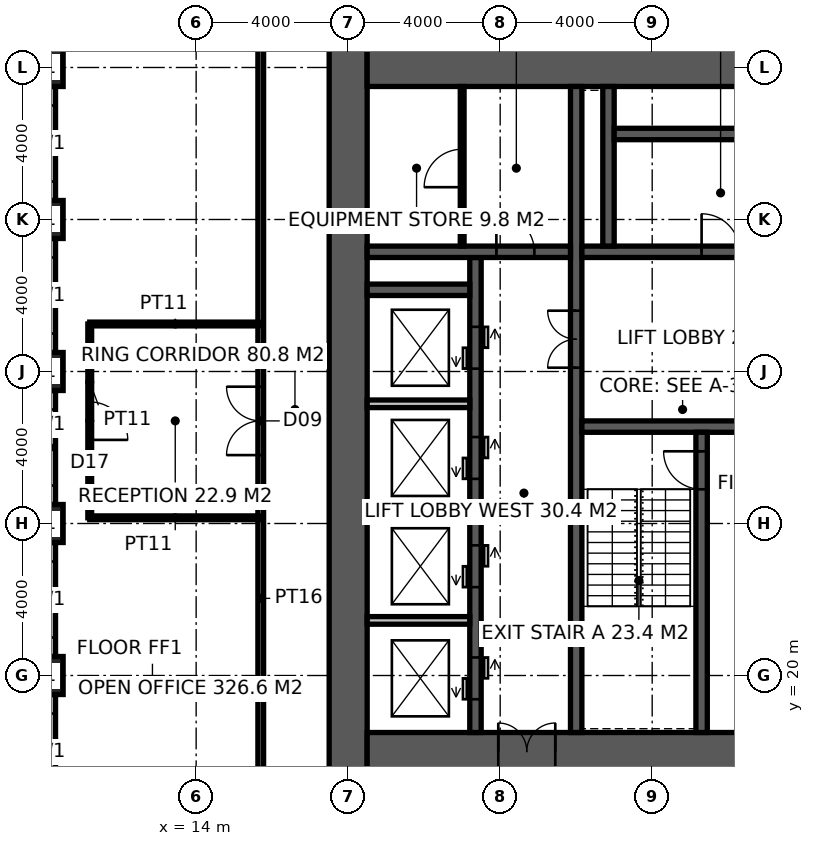
"""IFC4 building model, lengths in metres.
Left out: names, types, materials, properties, quantities, classifications, styles, units other than length and angle.
Written with IfcOpenShell. Run it as: python <this file> out.ifc"""

import sys

from ifc_helpers import new_model, si_unit, direction, frame, frame_2d, origin, origin_2d, place, context, subcontext, project, spatial, rectangle, hollow_rectangle, extrude, element, fill, save


model = new_model("IFC4")
c1 = context("Model", 3, precision=1e-05, world=origin(), true_north=direction((0.0, 1.0)))
c2 = subcontext(c1, "Body", "Model", "MODEL_VIEW")
j1 = project(units=[si_unit("LENGTHUNIT", "METRE"), si_unit("PLANEANGLEUNIT", "RADIAN")], contexts=[c1])
p1 = place(None, origin())
s1 = spatial("IfcSite", under=j1, at=p1, CompositionType="ELEMENT")
p2 = place(p1, origin())
s2 = spatial("IfcBuilding", under=s1, at=p2, CompositionType="ELEMENT")
p3 = place(p2, frame((0.0, 0.0, 254.2)))
s3 = spatial("IfcBuildingStorey", under=s2, at=p3, CompositionType="ELEMENT", Elevation=254.2)
for number, where, z_axis, x_axis in (
    (1, (10.0, 20.0, 0.0), (0.0, 0.0, 1.0), (1.0, 0.0, 0.0)),
    (2, (10.0, 24.0, 0.0), (0.0, 0.0, 1.0), (1.0, 0.0, 0.0)),
    (3, (10.0, 28.0, 0.0), (0.0, 0.0, 1.0), (1.0, 0.0, 0.0)),
    (4, (10.0, 32.0, 0.0), (0.0, 0.0, 1.0), (1.0, 0.0, 0.0)),
    (5, (10.0, 36.0, 0.0), (0.0, 0.0, 1.0), (1.0, 0.0, 0.0)),
):
    element("IfcColumn", number, at=place(p3, frame(where, z_axis=z_axis, x_axis=x_axis)), inside=s3, PredefinedType="COLUMN", context=c2, shape_type="SweptSolid", body=[
        extrude(hollow_rectangle(XDim=1.0, YDim=1.0, WallThickness=0.1, at=origin_2d()), origin(), (0.0, 0.0, 1.0), 4.0),
    ])
p4 = place(p3, frame((18.0, 17.5, -0.15), z_axis=(0.0, 0.0, 1.0), x_axis=(0.0, 1.0, 0.0)))
e6 = element("IfcWall", 6, at=p4, inside=s3, PredefinedType="SHEAR", context=c2, shape_type="SweptSolid", body=[
    extrude(rectangle(XDim=19.0, YDim=1.0, at=frame_2d((9.5, 0.0))), origin(), (0.0, 0.0, 1.0), 4.0),
])
p5 = place(p3, frame((18.5, 18.0, -0.15), z_axis=(0.0, 0.0, 1.0), x_axis=(1.0, 0.0, 0.0)))
e7 = element("IfcWall", 7, at=p5, inside=s3, PredefinedType="SHEAR", context=c2, shape_type="SweptSolid", body=[
    extrude(rectangle(XDim=17.6, YDim=1.0, at=frame_2d((8.8, 0.0))), origin(), (0.0, 0.0, 1.0), 4.0),
])
p6 = place(p5, frame((3.45, 0.0, 0.15)))
e8 = element("IfcOpeningElement", 8, at=p6, cuts=e7, PredefinedType="OPENING", context=c2, shape_type="SweptSolid", body=[
    extrude(rectangle(XDim=1.5, YDim=2.4, at=frame_2d((0.75, 1.2))), frame((0.0, 0.51, 0.0), z_axis=(0.0, -1.0, 0.0), x_axis=(1.0, 0.0, 0.0)), (0.0, 0.0, 1.0), 1.02),
])
p7 = place(p3, frame((18.5, 36.0, -0.15), z_axis=(0.0, 0.0, 1.0), x_axis=(1.0, 0.0, 0.0)))
e9 = element("IfcWall", 9, at=p7, inside=s3, PredefinedType="SHEAR", context=c2, shape_type="SweptSolid", body=[
    extrude(rectangle(XDim=17.6, YDim=1.0, at=frame_2d((8.8, 0.0))), origin(), (0.0, 0.0, 1.0), 4.0),
])
p8 = place(p3, frame((24.0, 18.5, -0.15), z_axis=(0.0, 0.0, 1.0), x_axis=(0.0, 1.0, 0.0)))
e10 = element("IfcWall", 10, at=p8, inside=s3, PredefinedType="SHEAR", context=c2, shape_type="SweptSolid", body=[
    extrude(rectangle(XDim=17.0, YDim=0.3, at=frame_2d((8.5, 0.0))), origin(), (0.0, 0.0, 1.0), 4.0),
])
p9 = place(p8, frame((9.6, 0.0, 0.15)))
e11 = element("IfcOpeningElement", 11, at=p9, cuts=e10, PredefinedType="OPENING", context=c2, shape_type="SweptSolid", body=[
    extrude(rectangle(XDim=1.5, YDim=2.4, at=frame_2d((0.75, 1.2))), frame((0.0, 0.16, 0.0), z_axis=(0.0, -1.0, 0.0), x_axis=(1.0, 0.0, 0.0)), (0.0, 0.0, 1.0), 0.32),
])
p10 = place(p3, frame((24.15, 26.55, -0.15), z_axis=(0.0, 0.0, 1.0), x_axis=(1.0, 0.0, 0.0)))
e12 = element("IfcWall", 12, at=p10, inside=s3, PredefinedType="SHEAR", context=c2, shape_type="SweptSolid", body=[
    extrude(rectangle(XDim=11.25, YDim=0.3, at=frame_2d((5.625, 0.0))), origin(), (0.0, 0.0, 1.0), 4.0),
])
p11 = place(p10, frame((9.25, 0.0, 0.15)))
e13 = element("IfcOpeningElement", 13, at=p11, cuts=e12, PredefinedType="OPENING", context=c2, shape_type="SweptSolid", body=[
    extrude(rectangle(XDim=1.0, YDim=2.2, at=frame_2d((0.5, 1.1))), frame((0.0, 0.16, 0.0), z_axis=(0.0, -1.0, 0.0), x_axis=(1.0, 0.0, 0.0)), (0.0, 0.0, 1.0), 0.32),
])
p12 = place(p10, frame((4.9, 0.0, 0.15)))
e14 = element("IfcOpeningElement", 14, at=p12, cuts=e12, PredefinedType="OPENING", context=c2, shape_type="SweptSolid", body=[
    extrude(rectangle(XDim=1.5, YDim=2.4, at=frame_2d((0.75, 1.2))), frame((0.0, 0.16, 0.0), z_axis=(0.0, -1.0, 0.0), x_axis=(1.0, 0.0, 0.0)), (0.0, 0.0, 1.0), 0.32),
])
p13 = place(p3, frame((27.3, 18.5, -0.15), z_axis=(0.0, 0.0, 1.0), x_axis=(0.0, 1.0, 0.0)))
e15 = element("IfcWall", 15, at=p13, inside=s3, PredefinedType="SHEAR", context=c2, shape_type="SweptSolid", body=[
    extrude(rectangle(XDim=7.9, YDim=0.3, at=frame_2d((3.95, 0.0))), origin(), (0.0, 0.0, 1.0), 4.0),
])
p14 = place(p13, frame((6.4, 0.0, 0.15)))
e16 = element("IfcOpeningElement", 16, at=p14, cuts=e15, PredefinedType="OPENING", context=c2, shape_type="SweptSolid", body=[
    extrude(rectangle(XDim=1.0, YDim=2.2, at=frame_2d((0.5, 1.1))), frame((0.0, 0.16, 0.0), z_axis=(0.0, -1.0, 0.0), x_axis=(1.0, 0.0, 0.0)), (0.0, 0.0, 1.0), 0.32),
])
p15 = place(p3, frame((24.15, 31.15, -0.15), z_axis=(0.0, 0.0, 1.0), x_axis=(1.0, 0.0, 0.0)))
e17 = element("IfcWall", 17, at=p15, inside=s3, PredefinedType="SHEAR", context=c2, shape_type="SweptSolid", body=[
    extrude(rectangle(XDim=11.25, YDim=0.3, at=frame_2d((5.625, 0.0))), origin(), (0.0, 0.0, 1.0), 4.0),
])
p16 = place(p15, frame((3.15, 0.0, 0.15)))
e18 = element("IfcOpeningElement", 18, at=p16, cuts=e17, PredefinedType="OPENING", context=c2, shape_type="SweptSolid", body=[
    extrude(rectangle(XDim=1.0, YDim=2.2, at=frame_2d((0.5, 1.1))), frame((0.0, 0.16, 0.0), z_axis=(0.0, -1.0, 0.0), x_axis=(1.0, 0.0, 0.0)), (0.0, 0.0, 1.0), 0.32),
])
p17 = place(p15, frame((7.25, 0.0, 0.15)))
e19 = element("IfcOpeningElement", 19, at=p17, cuts=e17, PredefinedType="OPENING", context=c2, shape_type="SweptSolid", body=[
    extrude(rectangle(XDim=1.4, YDim=2.4, at=frame_2d((0.7, 1.2))), frame((0.0, 0.16, 0.0), z_axis=(0.0, -1.0, 0.0), x_axis=(1.0, 0.0, 0.0)), (0.0, 0.0, 1.0), 0.32),
])
p18 = place(p3, frame((21.35, 18.5, -0.15), z_axis=(0.0, 0.0, 1.0), x_axis=(0.0, 1.0, 0.0)))
e20 = element("IfcWall", 20, at=p18, inside=s3, PredefinedType="SHEAR", context=c2, shape_type="SweptSolid", body=[
    extrude(rectangle(XDim=12.5, YDim=0.3, at=frame_2d((6.25, 0.0))), origin(), (0.0, 0.0, 1.0), 4.0),
])
p19 = place(p18, frame((0.875, 0.0, 0.15)))
e21 = element("IfcOpeningElement", 21, at=p19, cuts=e20, PredefinedType="OPENING", context=c2, shape_type="SweptSolid", body=[
    extrude(rectangle(XDim=1.1, YDim=2.2, at=frame_2d((0.55, 1.1))), frame((0.0, 0.16, 0.0), z_axis=(0.0, -1.0, 0.0), x_axis=(1.0, 0.0, 0.0)), (0.0, 0.0, 1.0), 0.32),
])
p20 = place(p18, frame((3.825, 0.0, 0.15)))
e22 = element("IfcOpeningElement", 22, at=p20, cuts=e20, PredefinedType="OPENING", context=c2, shape_type="SweptSolid", body=[
    extrude(rectangle(XDim=1.1, YDim=2.2, at=frame_2d((0.55, 1.1))), frame((0.0, 0.16, 0.0), z_axis=(0.0, -1.0, 0.0), x_axis=(1.0, 0.0, 0.0)), (0.0, 0.0, 1.0), 0.32),
])
p21 = place(p18, frame((6.675, 0.0, 0.15)))
e23 = element("IfcOpeningElement", 23, at=p21, cuts=e20, PredefinedType="OPENING", context=c2, shape_type="SweptSolid", body=[
    extrude(rectangle(XDim=1.1, YDim=2.2, at=frame_2d((0.55, 1.1))), frame((0.0, 0.16, 0.0), z_axis=(0.0, -1.0, 0.0), x_axis=(1.0, 0.0, 0.0)), (0.0, 0.0, 1.0), 0.32),
])
p22 = place(p18, frame((9.575, 0.0, 0.15)))
e24 = element("IfcOpeningElement", 24, at=p22, cuts=e20, PredefinedType="OPENING", context=c2, shape_type="SweptSolid", body=[
    extrude(rectangle(XDim=1.1, YDim=2.2, at=frame_2d((0.55, 1.1))), frame((0.0, 0.16, 0.0), z_axis=(0.0, -1.0, 0.0), x_axis=(1.0, 0.0, 0.0)), (0.0, 0.0, 1.0), 0.32),
])
p23 = place(p3, frame((18.5, 31.15, -0.15), z_axis=(0.0, 0.0, 1.0), x_axis=(1.0, 0.0, 0.0)))
e25 = element("IfcWall", 25, at=p23, inside=s3, PredefinedType="SHEAR", context=c2, shape_type="SweptSolid", body=[
    extrude(rectangle(XDim=5.35, YDim=0.3, at=frame_2d((2.675, 0.0))), origin(), (0.0, 0.0, 1.0), 4.0),
])
p24 = place(p23, frame((3.4, 0.0, 0.15)))
e26 = element("IfcOpeningElement", 26, at=p24, cuts=e25, PredefinedType="OPENING", context=c2, shape_type="SweptSolid", body=[
    extrude(rectangle(XDim=1.0, YDim=2.2, at=frame_2d((0.5, 1.1))), frame((0.0, 0.16, 0.0), z_axis=(0.0, -1.0, 0.0), x_axis=(1.0, 0.0, 0.0)), (0.0, 0.0, 1.0), 0.32),
])
p25 = place(p3, frame((18.5, 30.15, -0.15), z_axis=(0.0, 0.0, 1.0), x_axis=(1.0, 0.0, 0.0)))
e27 = element("IfcWall", 27, at=p25, inside=s3, PredefinedType="SHEAR", context=c2, shape_type="SweptSolid", body=[
    extrude(rectangle(XDim=2.7, YDim=0.3, at=frame_2d((1.35, 0.0))), origin(), (0.0, 0.0, 1.0), 4.0),
])
p26 = place(p3, frame((24.85, 31.3, -0.15), z_axis=(0.0, 0.0, 1.0), x_axis=(0.0, 1.0, 0.0)))
e28 = element("IfcWall", 28, at=p26, inside=s3, PredefinedType="SHEAR", context=c2, shape_type="SweptSolid", body=[
    extrude(rectangle(XDim=4.2, YDim=0.3, at=frame_2d((2.1, 0.0))), origin(), (0.0, 0.0, 1.0), 4.0),
])
p27 = place(p3, frame((25.0, 34.25, -0.15), z_axis=(0.0, 0.0, 1.0), x_axis=(1.0, 0.0, 0.0)))
e29 = element("IfcWall", 29, at=p27, inside=s3, PredefinedType="SHEAR", context=c2, shape_type="SweptSolid", body=[
    extrude(rectangle(XDim=8.6, YDim=0.3, at=frame_2d((4.3, 0.0))), origin(), (0.0, 0.0, 1.0), 4.0),
])
for number, where, z_axis, x_axis in (
    (30, (18.5, 21.45, -0.15), (0.0, 0.0, 1.0), (1.0, 0.0, 0.0)),
    (31, (18.5, 24.3, -0.15), (0.0, 0.0, 1.0), (1.0, 0.0, 0.0)),
    (32, (18.5, 27.15, -0.15), (0.0, 0.0, 1.0), (1.0, 0.0, 0.0)),
):
    element("IfcWall", number, at=place(p3, frame(where, z_axis=z_axis, x_axis=x_axis)), inside=s3, PredefinedType="SOLIDWALL", context=c2, shape_type="SweptSolid", body=[
        extrude(rectangle(XDim=2.7, YDim=0.2, at=frame_2d((1.35, 0.0))), origin(), (0.0, 0.0, 1.0), 4.0),
    ])
p28 = place(p3, frame((21.0, 31.3, 0.0), z_axis=(0.0, 0.0, 1.0), x_axis=(0.0, 1.0, 0.0)))
e33 = element("IfcWall", 33, at=p28, inside=s3, PredefinedType="PARTITIONING", context=c2, shape_type="SweptSolid", body=[
    extrude(rectangle(XDim=4.2, YDim=0.1, at=frame_2d((2.1, 0.0))), origin(), (0.0, 0.0, 1.0), 3.85),
])
p29 = place(p28, frame((1.55, 0.0, 0.0)))
e34 = element("IfcOpeningElement", 34, at=p29, cuts=e33, PredefinedType="OPENING", context=c2, shape_type="SweptSolid", body=[
    extrude(rectangle(XDim=1.0, YDim=2.2, at=frame_2d((0.5, 1.1))), frame((0.0, 0.06, 0.0), z_axis=(0.0, -1.0, 0.0), x_axis=(1.0, 0.0, 0.0)), (0.0, 0.0, 1.0), 0.12),
])
p30 = place(p3, frame((15.7, 15.025, 0.0), z_axis=(0.0, 0.0, 1.0), x_axis=(0.0, 1.0, 0.0)))
e35 = element("IfcWall", 35, at=p30, inside=s3, PredefinedType="PARTITIONING", context=c2, shape_type="SweptSolid", body=[
    extrude(rectangle(XDim=23.35, YDim=0.15, at=frame_2d((11.675, 0.0))), origin(), (0.0, 0.0, 1.0), 3.85),
])
p31 = place(p30, frame((10.775, 0.0, 0.0)))
e36 = element("IfcOpeningElement", 36, at=p31, cuts=e35, PredefinedType="OPENING", context=c2, shape_type="SweptSolid", body=[
    extrude(rectangle(XDim=1.8, YDim=2.4, at=frame_2d((0.9, 1.2))), frame((0.0, 0.085, 0.0), z_axis=(0.0, -1.0, 0.0), x_axis=(1.0, 0.0, 0.0)), (0.0, 0.0, 1.0), 0.17),
])
p32 = place(p3, frame((15.7, 29.25, 0.0), z_axis=(0.0, 0.0, 1.0), x_axis=(-1.0, 0.0, 0.0)))
e37 = element("IfcWall", 37, at=p32, inside=s3, PredefinedType="PARTITIONING", context=c2, shape_type="SweptSolid", body=[
    extrude(rectangle(XDim=4.5, YDim=0.1, at=frame_2d((2.25, 0.0))), origin(), (0.0, 0.0, 1.0), 3.85),
])
p33 = place(p3, frame((11.2, 29.25, 0.0), z_axis=(0.0, 0.0, 1.0), x_axis=(0.0, -1.0, 0.0)))
e38 = element("IfcWall", 38, at=p33, inside=s3, PredefinedType="PARTITIONING", context=c2, shape_type="SweptSolid", body=[
    extrude(rectangle(XDim=5.1, YDim=0.1, at=frame_2d((2.55, 0.0))), origin(), (0.0, 0.0, 1.0), 3.85),
])
p34 = place(p33, frame((2.05, 0.0, 0.0)))
e39 = element("IfcOpeningElement", 39, at=p34, cuts=e38, PredefinedType="OPENING", context=c2, shape_type="SweptSolid", body=[
    extrude(rectangle(XDim=1.0, YDim=2.2, at=frame_2d((0.5, 1.1))), frame((0.0, 0.06, 0.0), z_axis=(0.0, -1.0, 0.0), x_axis=(1.0, 0.0, 0.0)), (0.0, 0.0, 1.0), 0.12),
])
p35 = place(p3, frame((11.2, 24.15, 0.0), z_axis=(0.0, 0.0, 1.0), x_axis=(1.0, 0.0, 0.0)))
e40 = element("IfcWall", 40, at=p35, inside=s3, PredefinedType="PARTITIONING", context=c2, shape_type="SweptSolid", body=[
    extrude(rectangle(XDim=4.5, YDim=0.1, at=frame_2d((2.25, 0.0))), origin(), (0.0, 0.0, 1.0), 2.95),
])
p36 = place(p3, frame((10.15, 19.5, 0.0), z_axis=(0.0, 0.0, 1.0), x_axis=(0.0, -1.0, 0.0)))
e41 = element("IfcWall", 41, at=p36, inside=s3, PredefinedType="ELEMENTEDWALL", context=c2, shape_type="SweptSolid", body=[
    extrude(rectangle(XDim=3.0, YDim=0.3, at=frame_2d((1.5, 0.0))), origin(), (0.0, 0.0, 1.0), 2.85),
])
p37 = place(p36, frame((0.5, 0.0, 0.8)))
e42 = element("IfcOpeningElement", 42, at=p37, cuts=e41, PredefinedType="OPENING", context=c2, shape_type="SweptSolid", body=[
    extrude(rectangle(XDim=2.0, YDim=2.0, at=frame_2d((1.0, 1.0))), frame((0.0, 0.16, 0.0), z_axis=(0.0, -1.0, 0.0), x_axis=(1.0, 0.0, 0.0)), (0.0, 0.0, 1.0), 0.32),
])
p38 = place(p3, frame((10.15, 23.5, 0.0), z_axis=(0.0, 0.0, 1.0), x_axis=(0.0, -1.0, 0.0)))
e43 = element("IfcWall", 43, at=p38, inside=s3, PredefinedType="ELEMENTEDWALL", context=c2, shape_type="SweptSolid", body=[
    extrude(rectangle(XDim=3.0, YDim=0.3, at=frame_2d((1.5, 0.0))), origin(), (0.0, 0.0, 1.0), 2.85),
])
p39 = place(p38, frame((0.5, 0.0, 0.8)))
e44 = element("IfcOpeningElement", 44, at=p39, cuts=e43, PredefinedType="OPENING", context=c2, shape_type="SweptSolid", body=[
    extrude(rectangle(XDim=2.0, YDim=2.0, at=frame_2d((1.0, 1.0))), frame((0.0, 0.16, 0.0), z_axis=(0.0, -1.0, 0.0), x_axis=(1.0, 0.0, 0.0)), (0.0, 0.0, 1.0), 0.32),
])
p40 = place(p3, frame((10.15, 27.5, 0.0), z_axis=(0.0, 0.0, 1.0), x_axis=(0.0, -1.0, 0.0)))
e45 = element("IfcWall", 45, at=p40, inside=s3, PredefinedType="ELEMENTEDWALL", context=c2, shape_type="SweptSolid", body=[
    extrude(rectangle(XDim=3.0, YDim=0.3, at=frame_2d((1.5, 0.0))), origin(), (0.0, 0.0, 1.0), 2.85),
])
p41 = place(p40, frame((0.5, 0.0, 0.8)))
e46 = element("IfcOpeningElement", 46, at=p41, cuts=e45, PredefinedType="OPENING", context=c2, shape_type="SweptSolid", body=[
    extrude(rectangle(XDim=2.0, YDim=2.0, at=frame_2d((1.0, 1.0))), frame((0.0, 0.16, 0.0), z_axis=(0.0, -1.0, 0.0), x_axis=(1.0, 0.0, 0.0)), (0.0, 0.0, 1.0), 0.32),
])
p42 = place(p3, frame((10.15, 31.5, 0.0), z_axis=(0.0, 0.0, 1.0), x_axis=(0.0, -1.0, 0.0)))
e47 = element("IfcWall", 47, at=p42, inside=s3, PredefinedType="ELEMENTEDWALL", context=c2, shape_type="SweptSolid", body=[
    extrude(rectangle(XDim=3.0, YDim=0.3, at=frame_2d((1.5, 0.0))), origin(), (0.0, 0.0, 1.0), 2.85),
])
p43 = place(p42, frame((0.5, 0.0, 0.8)))
e48 = element("IfcOpeningElement", 48, at=p43, cuts=e47, PredefinedType="OPENING", context=c2, shape_type="SweptSolid", body=[
    extrude(rectangle(XDim=2.0, YDim=2.0, at=frame_2d((1.0, 1.0))), frame((0.0, 0.16, 0.0), z_axis=(0.0, -1.0, 0.0), x_axis=(1.0, 0.0, 0.0)), (0.0, 0.0, 1.0), 0.32),
])
p44 = place(p3, frame((10.15, 35.5, 0.0), z_axis=(0.0, 0.0, 1.0), x_axis=(0.0, -1.0, 0.0)))
e49 = element("IfcWall", 49, at=p44, inside=s3, PredefinedType="ELEMENTEDWALL", context=c2, shape_type="SweptSolid", body=[
    extrude(rectangle(XDim=3.0, YDim=0.3, at=frame_2d((1.5, 0.0))), origin(), (0.0, 0.0, 1.0), 2.85),
])
p45 = place(p44, frame((0.5, 0.0, 0.8)))
e50 = element("IfcOpeningElement", 50, at=p45, cuts=e49, PredefinedType="OPENING", context=c2, shape_type="SweptSolid", body=[
    extrude(rectangle(XDim=2.0, YDim=2.0, at=frame_2d((1.0, 1.0))), frame((0.0, 0.16, 0.0), z_axis=(0.0, -1.0, 0.0), x_axis=(1.0, 0.0, 0.0)), (0.0, 0.0, 1.0), 0.32),
])
p46 = place(p14, origin())
e51 = element("IfcDoor", 51, at=p46, inside=s3, OperationType="SINGLE_SWING_RIGHT", PredefinedType="DOOR", context=c2, shape_type="SweptSolid", body=[
    extrude(rectangle(XDim=1.0, YDim=2.2, at=frame_2d((0.5, 1.1))), frame((0.0, 0.025, 0.0), z_axis=(0.0, -1.0, 0.0), x_axis=(1.0, 0.0, 0.0)), (0.0, 0.0, 1.0), 0.05),
])
fill(e16, e51)
p47 = place(p9, origin())
e52 = element("IfcDoor", 52, at=p47, inside=s3, OperationType="DOUBLE_DOOR_DOUBLE_SWING", PredefinedType="DOOR", context=c2, shape_type="SweptSolid", body=[
    extrude(rectangle(XDim=1.5, YDim=2.4, at=frame_2d((0.75, 1.2))), frame((0.0, 0.025, 0.0), z_axis=(0.0, -1.0, 0.0), x_axis=(1.0, 0.0, 0.0)), (0.0, 0.0, 1.0), 0.05),
])
fill(e11, e52)
p48 = place(p24, origin())
e53 = element("IfcDoor", 53, at=p48, inside=s3, OperationType="SINGLE_SWING_LEFT", PredefinedType="DOOR", context=c2, shape_type="SweptSolid", body=[
    extrude(rectangle(XDim=1.0, YDim=2.2, at=frame_2d((0.5, 1.1))), frame((0.0, 0.025, 0.0), z_axis=(0.0, -1.0, 0.0), x_axis=(1.0, 0.0, 0.0)), (0.0, 0.0, 1.0), 0.05),
])
fill(e26, e53)
p49 = place(p29, origin())
e54 = element("IfcDoor", 54, at=p49, inside=s3, OperationType="SINGLE_SWING_LEFT", PredefinedType="DOOR", context=c2, shape_type="SweptSolid", body=[
    extrude(rectangle(XDim=1.0, YDim=2.2, at=frame_2d((0.5, 1.1))), frame((0.0, 0.025, 0.0), z_axis=(0.0, -1.0, 0.0), x_axis=(1.0, 0.0, 0.0)), (0.0, 0.0, 1.0), 0.05),
])
fill(e34, e54)
p50 = place(p16, origin())
e55 = element("IfcDoor", 55, at=p50, inside=s3, OperationType="SINGLE_SWING_LEFT", PredefinedType="DOOR", context=c2, shape_type="SweptSolid", body=[
    extrude(rectangle(XDim=1.0, YDim=2.2, at=frame_2d((0.5, 1.1))), frame((0.0, 0.025, 0.0), z_axis=(0.0, -1.0, 0.0), x_axis=(1.0, 0.0, 0.0)), (0.0, 0.0, 1.0), 0.05),
])
fill(e18, e55)
p51 = place(p6, origin())
e56 = element("IfcDoor", 56, at=p51, inside=s3, OperationType="DOUBLE_DOOR_DOUBLE_SWING", PredefinedType="DOOR", context=c2, shape_type="SweptSolid", body=[
    extrude(rectangle(XDim=1.5, YDim=2.4, at=frame_2d((0.75, 1.2))), frame((0.0, 0.025, 0.0), z_axis=(0.0, -1.0, 0.0), x_axis=(1.0, 0.0, 0.0)), (0.0, 0.0, 1.0), 0.05),
])
fill(e8, e56)
p52 = place(p31, origin())
e57 = element("IfcDoor", 57, at=p52, inside=s3, OperationType="DOUBLE_DOOR_DOUBLE_SWING", PredefinedType="DOOR", context=c2, shape_type="SweptSolid", body=[
    extrude(rectangle(XDim=1.8, YDim=2.4, at=frame_2d((0.9, 1.2))), frame((0.0, 0.025, 0.0), z_axis=(0.0, -1.0, 0.0), x_axis=(1.0, 0.0, 0.0)), (0.0, 0.0, 1.0), 0.05),
])
fill(e36, e57)
p53 = place(p34, origin())
e58 = element("IfcDoor", 58, at=p53, inside=s3, OperationType="SINGLE_SWING_RIGHT", PredefinedType="DOOR", context=c2, shape_type="SweptSolid", body=[
    extrude(rectangle(XDim=1.0, YDim=2.2, at=frame_2d((0.5, 1.1))), frame((0.0, 0.025, 0.0), z_axis=(0.0, -1.0, 0.0), x_axis=(1.0, 0.0, 0.0)), (0.0, 0.0, 1.0), 0.05),
])
fill(e39, e58)
p54 = place(p19, origin())
e59 = element("IfcDoor", 59, at=p54, inside=s3, OperationType="DOUBLE_DOOR_SLIDING", PredefinedType="DOOR", context=c2, shape_type="SweptSolid", body=[
    extrude(rectangle(XDim=1.1, YDim=2.2, at=frame_2d((0.55, 1.1))), frame((0.0, 0.025, 0.0), z_axis=(0.0, -1.0, 0.0), x_axis=(1.0, 0.0, 0.0)), (0.0, 0.0, 1.0), 0.05),
])
fill(e21, e59)
p55 = place(p20, origin())
e60 = element("IfcDoor", 60, at=p55, inside=s3, OperationType="DOUBLE_DOOR_SLIDING", PredefinedType="DOOR", context=c2, shape_type="SweptSolid", body=[
    extrude(rectangle(XDim=1.1, YDim=2.2, at=frame_2d((0.55, 1.1))), frame((0.0, 0.025, 0.0), z_axis=(0.0, -1.0, 0.0), x_axis=(1.0, 0.0, 0.0)), (0.0, 0.0, 1.0), 0.05),
])
fill(e22, e60)
p56 = place(p21, origin())
e61 = element("IfcDoor", 61, at=p56, inside=s3, OperationType="DOUBLE_DOOR_SLIDING", PredefinedType="DOOR", context=c2, shape_type="SweptSolid", body=[
    extrude(rectangle(XDim=1.1, YDim=2.2, at=frame_2d((0.55, 1.1))), frame((0.0, 0.025, 0.0), z_axis=(0.0, -1.0, 0.0), x_axis=(1.0, 0.0, 0.0)), (0.0, 0.0, 1.0), 0.05),
])
fill(e23, e61)
p57 = place(p22, origin())
e62 = element("IfcDoor", 62, at=p57, inside=s3, OperationType="DOUBLE_DOOR_SLIDING", PredefinedType="DOOR", context=c2, shape_type="SweptSolid", body=[
    extrude(rectangle(XDim=1.1, YDim=2.2, at=frame_2d((0.55, 1.1))), frame((0.0, 0.025, 0.0), z_axis=(0.0, -1.0, 0.0), x_axis=(1.0, 0.0, 0.0)), (0.0, 0.0, 1.0), 0.05),
])
fill(e24, e62)
save(model, sys.argv[1])
